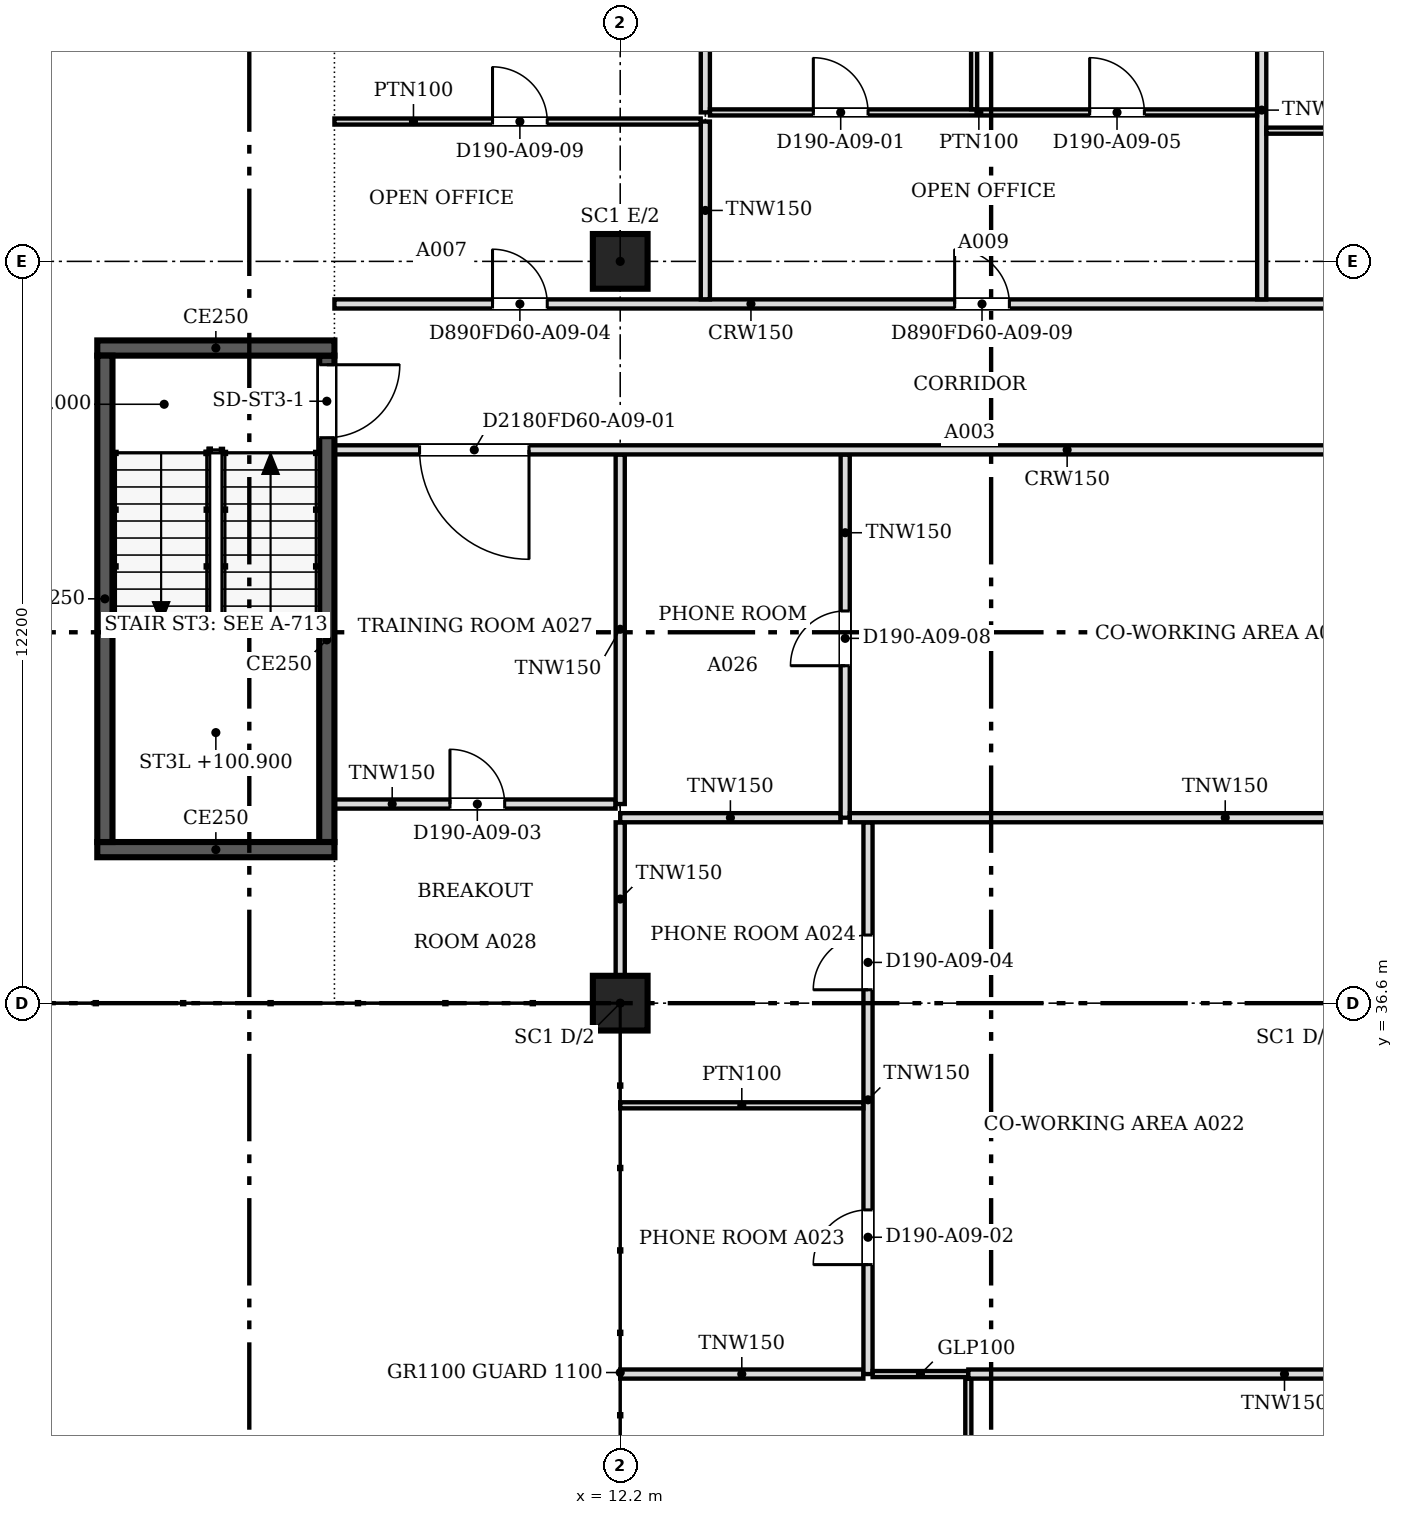
"""IFC4 building model, lengths in metres.
Left out: names, types, materials, properties, quantities, classifications, styles, units other than length and angle.
Written with IfcOpenShell. Run it as: python <this file> out.ifc"""

import sys

from ifc_helpers import new_model, si_unit, direction, frame, frame_2d, origin, origin_2d, place, context, subcontext, project, spatial, polyline, rectangle, outline, extrude, faceted_brep, source, transform, mapped, element, fill, save


model = new_model("IFC4")
c1 = context("Model", 3, precision=1e-05, world=origin(), true_north=direction((0.0, 1.0)))
c2 = subcontext(c1, "Body", "Model", "MODEL_VIEW")
j1 = project(units=[si_unit("LENGTHUNIT", "METRE"), si_unit("PLANEANGLEUNIT", "RADIAN")], contexts=[c1])
p1 = place(None, origin())
s1 = spatial("IfcSite", under=j1, at=p1, CompositionType="ELEMENT")
p2 = place(p1, origin())
s2 = spatial("IfcBuilding", under=s1, at=p2, CompositionType="ELEMENT")
p3 = place(p2, frame((0.0, 0.0, 99.0)))
s3 = spatial("IfcBuildingStorey", under=s2, at=p3, CompositionType="ELEMENT", Elevation=99.0)
for number, where, z_axis, x_axis in (
    (1, (12.2, 36.6, 0.0), (0.0, 0.0, 1.0), (1.0, 0.0, 0.0)),
    (2, (12.2, 48.8, 0.0), (0.0, 0.0, 1.0), (1.0, 0.0, 0.0)),
):
    element("IfcColumn", number, at=place(p3, frame(where, z_axis=z_axis, x_axis=x_axis)), inside=s3, PredefinedType="COLUMN", context=c2, shape_type="SweptSolid", body=[
        extrude(rectangle(XDim=0.9, YDim=0.9, at=origin_2d()), origin(), (0.0, 0.0, 1.0), 3.6),
    ])
m1 = source(origin(), c2, "Body", "Brep", [
    faceted_brep([(2.944, -0.25, 0.0), (2.997, -0.25, 0.068), (2.997, -0.25, 7.532), (2.944, -0.25, 7.6), (0.0, -0.25, 3.8), (0.053, 0.25, 3.868), (2.891, 0.25, 7.532), (2.891, 0.25, 0.068), (0.053, 0.25, 3.732), (2.944, 0.0, 0.0), (2.944, 0.0, 7.6), (0.0, 0.0, 3.8)], [[[0, 1, 2, 3, 4]], [[5, 6, 7, 8]], [[1, 0, 9]], [[10, 3, 2]], [[6, 5, 11, 4, 3, 10]], [[8, 7, 9, 0, 4, 11]], [[8, 11, 5]], [[1, 9, 7, 6, 10, 2]]]),
])
p4 = place(p3, frame((3.394, 53.588, -3.8), z_axis=(0.0, 0.0, 1.0), x_axis=(-0.707106781187, -0.707106781187, 0.0)))
e3 = element("IfcWall", 3, at=p4, inside=s3, PredefinedType="SOLIDWALL", context=c2, shape_type="MappedRepresentation", body=[
    mapped(m1, transform((0.0, 0.0, 0.0), scale=1.0)),
])
m2 = source(origin(), c2, "Body", "SweptSolid", [
    extrude(outline(polyline([(2.744, 6.934), (0.316, 3.8), (2.744, 0.666), (2.744, 6.934)])), frame((0.0, 0.26, 0.0), z_axis=(0.0, -1.0, 0.0), x_axis=(1.0, 0.0, 0.0)), (0.0, 0.0, 1.0), 0.52),
])
p5 = place(p4, origin())
e4 = element("IfcOpeningElement", 4, at=p5, cuts=e3, PredefinedType="OPENING", context=c2, shape_type="MappedRepresentation", body=[
    mapped(m2, transform((0.0, 0.0, 0.0), scale=1.0)),
])
p6 = place(p2, frame((0.0, 0.0, 102.8)))
s4 = spatial("IfcBuildingStorey", under=s2, at=p6, CompositionType="ELEMENT", Elevation=102.8)
m3 = source(origin(), c2, "Body", "Brep", [
    faceted_brep([(0.053, -0.25, 0.0), (2.997, -0.25, 3.8), (0.053, -0.25, 7.6), (0.0, -0.25, 7.532), (0.0, -0.25, 0.068), (0.106, 0.25, 7.532), (2.944, 0.25, 3.868), (2.944, 0.25, 3.732), (0.106, 0.25, 0.068), (2.997, 0.0, 3.8), (0.053, 0.0, 0.0), (0.053, 0.0, 7.6)], [[[0, 1, 2, 3, 4]], [[5, 6, 7, 8]], [[8, 7, 9, 1, 0, 10]], [[6, 5, 11, 2, 1, 9]], [[3, 2, 11]], [[10, 0, 4]], [[8, 10, 4, 3, 11, 5]], [[9, 7, 6]]]),
])
p7 = place(p6, frame((3.431, 53.625, -3.8), z_axis=(0.0, 0.0, 1.0), x_axis=(-0.707106781187, -0.707106781187, 0.0)))
e5 = element("IfcWall", 5, at=p7, inside=s4, PredefinedType="SOLIDWALL", context=c2, shape_type="MappedRepresentation", body=[
    mapped(m3, transform((0.0, 0.0, 0.0), scale=1.0)),
])
m4 = source(origin(), c2, "Body", "SweptSolid", [
    extrude(outline(polyline([(0.253, 0.666), (2.681, 3.8), (0.253, 6.934), (0.253, 0.666)])), frame((0.0, 0.26, 0.0), z_axis=(0.0, -1.0, 0.0), x_axis=(1.0, 0.0, 0.0)), (0.0, 0.0, 1.0), 0.52),
])
p8 = place(p7, origin())
e6 = element("IfcOpeningElement", 6, at=p8, cuts=e5, PredefinedType="OPENING", context=c2, shape_type="MappedRepresentation", body=[
    mapped(m4, transform((0.0, 0.0, 0.0), scale=1.0)),
])
p9 = place(p3, frame((7.5, 39.125, 0.0), z_axis=(0.0, 0.0, 1.0), x_axis=(-1.0, 0.0, 0.0)))
e7 = element("IfcWall", 7, at=p9, inside=s3, PredefinedType="SOLIDWALL", context=c2, shape_type="SweptSolid", body=[
    extrude(rectangle(XDim=3.9, YDim=0.25, at=frame_2d((1.95, 0.0))), origin(), (0.0, 0.0, 1.0), 3.8),
])
p10 = place(p3, frame((3.725, 39.25, 0.0), z_axis=(0.0, 0.0, 1.0), x_axis=(0.0, 1.0, 0.0)))
e8 = element("IfcWall", 8, at=p10, inside=s3, PredefinedType="SOLIDWALL", context=c2, shape_type="SweptSolid", body=[
    extrude(rectangle(XDim=8.0, YDim=0.25, at=frame_2d((4.0, 0.0))), origin(), (0.0, 0.0, 1.0), 3.8),
])
p11 = place(p3, frame((3.6, 47.375, 0.0), z_axis=(0.0, 0.0, 1.0), x_axis=(1.0, 0.0, 0.0)))
e9 = element("IfcWall", 9, at=p11, inside=s3, PredefinedType="SOLIDWALL", context=c2, shape_type="SweptSolid", body=[
    extrude(rectangle(XDim=3.9, YDim=0.25, at=frame_2d((1.95, 0.0))), origin(), (0.0, 0.0, 1.0), 3.8),
])
p12 = place(p3, frame((7.375, 47.25, 0.0), z_axis=(0.0, 0.0, 1.0), x_axis=(0.0, -1.0, 0.0)))
e10 = element("IfcWall", 10, at=p12, inside=s3, PredefinedType="SOLIDWALL", context=c2, shape_type="SweptSolid", body=[
    extrude(rectangle(XDim=8.0, YDim=0.25, at=frame_2d((4.0, 0.0))), origin(), (0.0, 0.0, 1.0), 3.8),
])
m5 = source(origin(), c2, "Body", "SweptSolid", [
    extrude(rectangle(XDim=1.2, YDim=2.1, at=frame_2d((0.6, 1.05))), frame((0.0, 0.135, 0.0), z_axis=(0.0, -1.0, 0.0), x_axis=(1.0, 0.0, 0.0)), (0.0, 0.0, 1.0), 0.27),
])
p13 = place(p12, frame((0.15, 0.0, 0.0)))
e11 = element("IfcOpeningElement", 11, at=p13, cuts=e10, PredefinedType="OPENING", context=c2, shape_type="MappedRepresentation", body=[
    mapped(m5, transform((0.0, 0.0, 0.0), scale=1.0)),
])
p14 = place(p3, frame((17.925, 24.476, 0.0), z_axis=(0.0, 0.0, 1.0), x_axis=(0.0, 1.0, 0.0)))
e12 = element("IfcWall", 12, at=p14, inside=s3, PredefinedType="PARTITIONING", context=c2, shape_type="SweptSolid", body=[
    extrude(rectangle(XDim=5.948, YDim=0.1, at=frame_2d((2.974, 0.0))), origin(), (0.0, 0.0, 1.0), 3.067),
])
m6 = source(origin(), c2, "Body", "SweptSolid", [
    extrude(rectangle(XDim=0.9, YDim=2.1, at=frame_2d((0.45, 1.05))), frame((0.0, 0.06, 0.0), z_axis=(0.0, -1.0, 0.0), x_axis=(1.0, 0.0, 0.0)), (0.0, 0.0, 1.0), 0.12),
])
p15 = place(p14, frame((2.5, 0.0, 0.0)))
e13 = element("IfcOpeningElement", 13, at=p15, cuts=e12, PredefinedType="OPENING", context=c2, shape_type="MappedRepresentation", body=[
    mapped(m6, transform((0.0, 0.0, 0.0), scale=1.0)),
])
p16 = place(p3, frame((12.2, 30.5, 0.0), z_axis=(0.0, 0.0, 1.0), x_axis=(1.0, 0.0, 0.0)))
e14 = element("IfcWall", 14, at=p16, inside=s3, PredefinedType="PARTITIONING", context=c2, shape_type="SweptSolid", body=[
    extrude(rectangle(XDim=3.999, YDim=0.15, at=frame_2d((2.0, 0.0))), origin(), (0.0, 0.0, 1.0), 3.067),
])
p17 = place(p3, frame((16.275, 30.5, 0.0), z_axis=(0.0, 0.0, 1.0), x_axis=(0.0, 1.0, 0.0)))
e15 = element("IfcWall", 15, at=p17, inside=s3, PredefinedType="PARTITIONING", context=c2, shape_type="SweptSolid", body=[
    extrude(rectangle(XDim=9.074, YDim=0.15, at=frame_2d((4.537, 0.0))), origin(), (0.0, 0.0, 1.0), 3.067),
])
m7 = source(origin(), c2, "Body", "SweptSolid", [
    extrude(rectangle(XDim=0.9, YDim=2.1, at=frame_2d((0.45, 1.05))), frame((0.0, 0.085, 0.0), z_axis=(0.0, -1.0, 0.0), x_axis=(1.0, 0.0, 0.0)), (0.0, 0.0, 1.0), 0.17),
])
p18 = place(p17, frame((1.8, 0.0, 0.0)))
e16 = element("IfcOpeningElement", 16, at=p18, cuts=e15, PredefinedType="OPENING", context=c2, shape_type="MappedRepresentation", body=[
    mapped(m7, transform((0.0, 0.0, 0.0), scale=1.0)),
])
p19 = place(p17, frame((6.32, 0.0, 0.0)))
e17 = element("IfcOpeningElement", 17, at=p19, cuts=e15, PredefinedType="OPENING", context=c2, shape_type="MappedRepresentation", body=[
    mapped(m7, transform((0.0, 0.0, 0.0), scale=1.0)),
])
p20 = place(p3, frame((16.351, 30.5, 0.0), z_axis=(0.0, 0.0, 1.0), x_axis=(1.0, 0.0, 0.0)))
e18 = element("IfcWall", 18, at=p20, inside=s3, PredefinedType="PARTITIONING", context=c2, shape_type="SweptSolid", body=[
    extrude(rectangle(XDim=1.573, YDim=0.1, at=frame_2d((0.787, 0.0))), origin(), (0.0, 0.0, 1.0), 3.067),
])
p21 = place(p3, frame((17.925, 30.5, 0.0), z_axis=(0.0, 0.0, 1.0), x_axis=(1.0, 0.0, 0.0)))
e19 = element("IfcWall", 19, at=p21, inside=s3, PredefinedType="PARTITIONING", context=c2, shape_type="SweptSolid", body=[
    extrude(rectangle(XDim=10.399, YDim=0.15, at=frame_2d((5.199, 0.0))), origin(), (0.0, 0.0, 1.0), 3.067),
])
p22 = place(p3, frame((12.2, 34.92, 0.0), z_axis=(0.0, 0.0, 1.0), x_axis=(1.0, 0.0, 0.0)))
e20 = element("IfcWall", 20, at=p22, inside=s3, PredefinedType="PARTITIONING", context=c2, shape_type="SweptSolid", body=[
    extrude(rectangle(XDim=3.999, YDim=0.1, at=frame_2d((2.0, 0.0))), origin(), (0.0, 0.0, 1.0), 3.067),
])
p23 = place(p3, frame((12.2, 37.051, 0.0), z_axis=(0.0, 0.0, 1.0), x_axis=(0.0, 1.0, 0.0)))
e21 = element("IfcWall", 21, at=p23, inside=s3, PredefinedType="PARTITIONING", context=c2, shape_type="SweptSolid", body=[
    extrude(rectangle(XDim=2.523, YDim=0.15, at=frame_2d((1.261, 0.0))), origin(), (0.0, 0.0, 1.0), 3.067),
])
p24 = place(p3, frame((12.2, 39.65, 0.0), z_axis=(0.0, 0.0, 1.0), x_axis=(1.0, 0.0, 0.0)))
e22 = element("IfcWall", 22, at=p24, inside=s3, PredefinedType="PARTITIONING", context=c2, shape_type="SweptSolid", body=[
    extrude(rectangle(XDim=3.624, YDim=0.15, at=frame_2d((1.812, 0.0))), origin(), (0.0, 0.0, 1.0), 3.067),
])
p25 = place(p3, frame((15.9, 39.65, 0.0), z_axis=(0.0, 0.0, 1.0), x_axis=(0.0, 1.0, 0.0)))
e23 = element("IfcWall", 23, at=p25, inside=s3, PredefinedType="PARTITIONING", context=c2, shape_type="SweptSolid", body=[
    extrude(rectangle(XDim=5.974, YDim=0.15, at=frame_2d((2.987, 0.0))), origin(), (0.0, 0.0, 1.0), 3.067),
])
p26 = place(p25, frame((2.5, 0.0, 0.0)))
e24 = element("IfcOpeningElement", 24, at=p26, cuts=e23, PredefinedType="OPENING", context=c2, shape_type="MappedRepresentation", body=[
    mapped(m7, transform((0.0, 0.0, 0.0), scale=1.0)),
])
p27 = place(p3, frame((15.976, 39.65, 0.0), z_axis=(0.0, 0.0, 1.0), x_axis=(1.0, 0.0, 0.0)))
e25 = element("IfcWall", 25, at=p27, inside=s3, PredefinedType="PARTITIONING", context=c2, shape_type="SweptSolid", body=[
    extrude(rectangle(XDim=12.348, YDim=0.15, at=frame_2d((6.174, 0.0))), origin(), (0.0, 0.0, 1.0), 3.067),
])
p28 = place(p3, frame((12.124, 39.875, 0.0), z_axis=(0.0, 0.0, 1.0), x_axis=(-1.0, 0.0, 0.0)))
e26 = element("IfcWall", 26, at=p28, inside=s3, PredefinedType="PARTITIONING", context=c2, shape_type="SweptSolid", body=[
    extrude(rectangle(XDim=4.624, YDim=0.15, at=frame_2d((2.312, 0.0))), origin(), (0.0, 0.0, 1.0), 3.067),
])
p29 = place(p28, frame((1.824, 0.0, 0.0)))
e27 = element("IfcOpeningElement", 27, at=p29, cuts=e26, PredefinedType="OPENING", context=c2, shape_type="MappedRepresentation", body=[
    mapped(m7, transform((0.0, 0.0, 0.0), scale=1.0)),
])
p30 = place(p3, frame((12.2, 39.875, 0.0), z_axis=(0.0, 0.0, 1.0), x_axis=(0.0, 1.0, 0.0)))
e28 = element("IfcWall", 28, at=p30, inside=s3, PredefinedType="PARTITIONING", context=c2, shape_type="SweptSolid", body=[
    extrude(rectangle(XDim=5.749, YDim=0.15, at=frame_2d((2.875, 0.0))), origin(), (0.0, 0.0, 1.0), 3.067),
])
p31 = place(p3, frame((28.4, 45.7, 0.0), z_axis=(0.0, 0.0, 1.0), x_axis=(-1.0, 0.0, 0.0)))
e29 = element("IfcWall", 29, at=p31, inside=s3, PredefinedType="PARTITIONING", context=c2, shape_type="SweptSolid", body=[
    extrude(rectangle(XDim=20.9, YDim=0.15, at=frame_2d((10.45, 0.0))), origin(), (0.0, 0.0, 1.0), 3.067),
])
m8 = source(origin(), c2, "Body", "SweptSolid", [
    extrude(rectangle(XDim=1.8, YDim=2.1, at=frame_2d((0.9, 1.05))), frame((0.0, 0.085, 0.0), z_axis=(0.0, -1.0, 0.0), x_axis=(1.0, 0.0, 0.0)), (0.0, 0.0, 1.0), 0.17),
])
p32 = place(p31, frame((17.7, 0.0, 0.0)))
e30 = element("IfcOpeningElement", 30, at=p32, cuts=e29, PredefinedType="OPENING", context=c2, shape_type="MappedRepresentation", body=[
    mapped(m8, transform((0.0, 0.0, 0.0), scale=1.0)),
])
p33 = place(p3, frame((7.5, 48.1, 0.0), z_axis=(0.0, 0.0, 1.0), x_axis=(1.0, 0.0, 0.0)))
e31 = element("IfcWall", 31, at=p33, inside=s3, PredefinedType="PARTITIONING", context=c2, shape_type="SweptSolid", body=[
    extrude(rectangle(XDim=20.9, YDim=0.15, at=frame_2d((10.45, 0.0))), origin(), (0.0, 0.0, 1.0), 3.067),
])
p34 = place(p33, frame((17.651, 0.0, 0.0)))
e32 = element("IfcOpeningElement", 32, at=p34, cuts=e31, PredefinedType="OPENING", context=c2, shape_type="MappedRepresentation", body=[
    mapped(m7, transform((0.0, 0.0, 0.0), scale=1.0)),
])
p35 = place(p33, frame((2.6, 0.0, 0.0)))
e33 = element("IfcOpeningElement", 33, at=p35, cuts=e31, PredefinedType="OPENING", context=c2, shape_type="MappedRepresentation", body=[
    mapped(m7, transform((0.0, 0.0, 0.0), scale=1.0)),
])
p36 = place(p33, frame((10.2, 0.0, 0.0)))
e34 = element("IfcOpeningElement", 34, at=p36, cuts=e31, PredefinedType="OPENING", context=c2, shape_type="MappedRepresentation", body=[
    mapped(m7, transform((0.0, 0.0, 0.0), scale=1.0)),
])
p37 = place(p3, frame((13.6, 48.176, 0.0), z_axis=(0.0, 0.0, 1.0), x_axis=(0.0, 1.0, 0.0)))
e35 = element("IfcWall", 35, at=p37, inside=s3, PredefinedType="PARTITIONING", context=c2, shape_type="SweptSolid", body=[
    extrude(rectangle(XDim=2.924, YDim=0.15, at=frame_2d((1.462, 0.0))), origin(), (0.0, 0.0, 1.0), 3.067),
])
p38 = place(p3, frame((22.75, 48.176, 0.0), z_axis=(0.0, 0.0, 1.0), x_axis=(0.0, 1.0, 0.0)))
e36 = element("IfcWall", 36, at=p38, inside=s3, PredefinedType="PARTITIONING", context=c2, shape_type="SweptSolid", body=[
    extrude(rectangle(XDim=6.224, YDim=0.15, at=frame_2d((3.112, 0.0))), origin(), (0.0, 0.0, 1.0), 3.067),
])
p39 = place(p3, frame((22.826, 50.95, 0.0), z_axis=(0.0, 0.0, 1.0), x_axis=(1.0, 0.0, 0.0)))
e37 = element("IfcWall", 37, at=p39, inside=s3, PredefinedType="PARTITIONING", context=c2, shape_type="SweptSolid", body=[
    extrude(rectangle(XDim=5.573, YDim=0.1, at=frame_2d((2.787, 0.0))), origin(), (0.0, 0.0, 1.0), 3.067),
])
p40 = place(p39, frame((2.3, 0.0, 0.0)))
e38 = element("IfcOpeningElement", 38, at=p40, cuts=e37, PredefinedType="OPENING", context=c2, shape_type="MappedRepresentation", body=[
    mapped(m6, transform((0.0, 0.0, 0.0), scale=1.0)),
])
p41 = place(p3, frame((7.5, 51.1, 0.0), z_axis=(0.0, 0.0, 1.0), x_axis=(1.0, 0.0, 0.0)))
e39 = element("IfcWall", 39, at=p41, inside=s3, PredefinedType="PARTITIONING", context=c2, shape_type="SweptSolid", body=[
    extrude(rectangle(XDim=6.024, YDim=0.1, at=frame_2d((3.012, 0.0))), origin(), (0.0, 0.0, 1.0), 3.067),
])
p42 = place(p41, frame((2.6, 0.0, 0.0)))
e40 = element("IfcOpeningElement", 40, at=p42, cuts=e39, PredefinedType="OPENING", context=c2, shape_type="MappedRepresentation", body=[
    mapped(m6, transform((0.0, 0.0, 0.0), scale=1.0)),
])
p43 = place(p3, frame((13.6, 51.25, 0.0), z_axis=(0.0, 0.0, 1.0), x_axis=(0.0, 1.0, 0.0)))
e41 = element("IfcWall", 41, at=p43, inside=s3, PredefinedType="PARTITIONING", context=c2, shape_type="SweptSolid", body=[
    extrude(rectangle(XDim=3.15, YDim=0.15, at=frame_2d((1.575, 0.0))), origin(), (0.0, 0.0, 1.0), 3.067),
])
p44 = place(p3, frame((13.676, 51.25, 0.0), z_axis=(0.0, 0.0, 1.0), x_axis=(1.0, 0.0, 0.0)))
e42 = element("IfcWall", 42, at=p44, inside=s3, PredefinedType="PARTITIONING", context=c2, shape_type="SweptSolid", body=[
    extrude(rectangle(XDim=8.998, YDim=0.1, at=frame_2d((4.499, 0.0))), origin(), (0.0, 0.0, 1.0), 3.067),
])
p45 = place(p44, frame((1.7, 0.0, 0.0)))
e43 = element("IfcOpeningElement", 43, at=p45, cuts=e42, PredefinedType="OPENING", context=c2, shape_type="MappedRepresentation", body=[
    mapped(m6, transform((0.0, 0.0, 0.0), scale=1.0)),
])
p46 = place(p44, frame((6.244, 0.0, 0.0)))
e44 = element("IfcOpeningElement", 44, at=p46, cuts=e42, PredefinedType="OPENING", context=c2, shape_type="MappedRepresentation", body=[
    mapped(m6, transform((0.0, 0.0, 0.0), scale=1.0)),
])
p47 = place(p3, frame((18.02, 51.301, 0.0), z_axis=(0.0, 0.0, 1.0), x_axis=(0.0, 1.0, 0.0)))
e45 = element("IfcWall", 45, at=p47, inside=s3, PredefinedType="PARTITIONING", context=c2, shape_type="SweptSolid", body=[
    extrude(rectangle(XDim=3.099, YDim=0.1, at=frame_2d((1.549, 0.0))), origin(), (0.0, 0.0, 1.0), 3.067),
])
m9 = source(origin(), c2, "Body", "SweptSolid", [
    extrude(rectangle(XDim=1.2, YDim=2.1, at=frame_2d((0.6, 1.05))), frame((0.0, 0.025, 0.0), z_axis=(0.0, -1.0, 0.0), x_axis=(1.0, 0.0, 0.0)), (0.0, 0.0, 1.0), 0.05),
])
p48 = place(p13, origin())
e46 = element("IfcDoor", 46, at=p48, inside=s3, OperationType="SINGLE_SWING_LEFT", PredefinedType="DOOR", context=c2, shape_type="MappedRepresentation", body=[
    mapped(m9, transform((0.0, 0.0, 0.0), scale=1.0)),
])
fill(e11, e46)
m10 = source(origin(), c2, "Body", "SweptSolid", [
    extrude(rectangle(XDim=0.9, YDim=2.1, at=frame_2d((0.45, 1.05))), frame((0.0, 0.025, 0.0), z_axis=(0.0, -1.0, 0.0), x_axis=(1.0, 0.0, 0.0)), (0.0, 0.0, 1.0), 0.05),
])
p49 = place(p45, origin())
e47 = element("IfcDoor", 47, at=p49, inside=s3, OperationType="SINGLE_SWING_LEFT", PredefinedType="DOOR", context=c2, shape_type="MappedRepresentation", body=[
    mapped(m10, transform((0.0, 0.0, 0.0), scale=1.0)),
])
fill(e43, e47)
p50 = place(p18, origin())
e48 = element("IfcDoor", 48, at=p50, inside=s3, OperationType="SINGLE_SWING_LEFT", PredefinedType="DOOR", context=c2, shape_type="MappedRepresentation", body=[
    mapped(m10, transform((0.0, 0.0, 0.0), scale=1.0)),
])
fill(e16, e48)
p51 = place(p29, origin())
e49 = element("IfcDoor", 49, at=p51, inside=s3, OperationType="SINGLE_SWING_RIGHT", PredefinedType="DOOR", context=c2, shape_type="MappedRepresentation", body=[
    mapped(m10, transform((0.0, 0.0, 0.0), scale=1.0)),
])
fill(e27, e49)
p52 = place(p19, origin())
e50 = element("IfcDoor", 50, at=p52, inside=s3, OperationType="SINGLE_SWING_LEFT", PredefinedType="DOOR", context=c2, shape_type="MappedRepresentation", body=[
    mapped(m10, transform((0.0, 0.0, 0.0), scale=1.0)),
])
fill(e17, e50)
p53 = place(p46, origin())
e51 = element("IfcDoor", 51, at=p53, inside=s3, OperationType="SINGLE_SWING_LEFT", PredefinedType="DOOR", context=c2, shape_type="MappedRepresentation", body=[
    mapped(m10, transform((0.0, 0.0, 0.0), scale=1.0)),
])
fill(e44, e51)
m11 = source(origin(), c2, "Body", "SweptSolid", [
    extrude(rectangle(XDim=1.8, YDim=2.1, at=frame_2d((0.9, 1.05))), frame((0.0, 0.025, 0.0), z_axis=(0.0, -1.0, 0.0), x_axis=(1.0, 0.0, 0.0)), (0.0, 0.0, 1.0), 0.05),
])
p54 = place(p32, origin())
e52 = element("IfcDoor", 52, at=p54, inside=s3, OperationType="DOUBLE_DOOR_SINGLE_SWING", PredefinedType="DOOR", context=c2, shape_type="MappedRepresentation", body=[
    mapped(m11, transform((0.0, 0.0, 0.0), scale=1.0)),
])
fill(e30, e52)
p55 = place(p26, origin())
e53 = element("IfcDoor", 53, at=p55, inside=s3, OperationType="SINGLE_SWING_LEFT", PredefinedType="DOOR", context=c2, shape_type="MappedRepresentation", body=[
    mapped(m10, transform((0.0, 0.0, 0.0), scale=1.0)),
])
fill(e24, e53)
p56 = place(p42, origin())
e54 = element("IfcDoor", 54, at=p56, inside=s3, OperationType="SINGLE_SWING_LEFT", PredefinedType="DOOR", context=c2, shape_type="MappedRepresentation", body=[
    mapped(m10, transform((0.0, 0.0, 0.0), scale=1.0)),
])
fill(e40, e54)
p57 = place(p35, origin())
e55 = element("IfcDoor", 55, at=p57, inside=s3, OperationType="SINGLE_SWING_LEFT", PredefinedType="DOOR", context=c2, shape_type="MappedRepresentation", body=[
    mapped(m10, transform((0.0, 0.0, 0.0), scale=1.0)),
])
fill(e33, e55)
p58 = place(p36, origin())
e56 = element("IfcDoor", 56, at=p58, inside=s3, OperationType="SINGLE_SWING_LEFT", PredefinedType="DOOR", context=c2, shape_type="MappedRepresentation", body=[
    mapped(m10, transform((0.0, 0.0, 0.0), scale=1.0)),
])
fill(e34, e56)
save(model, sys.argv[1])
